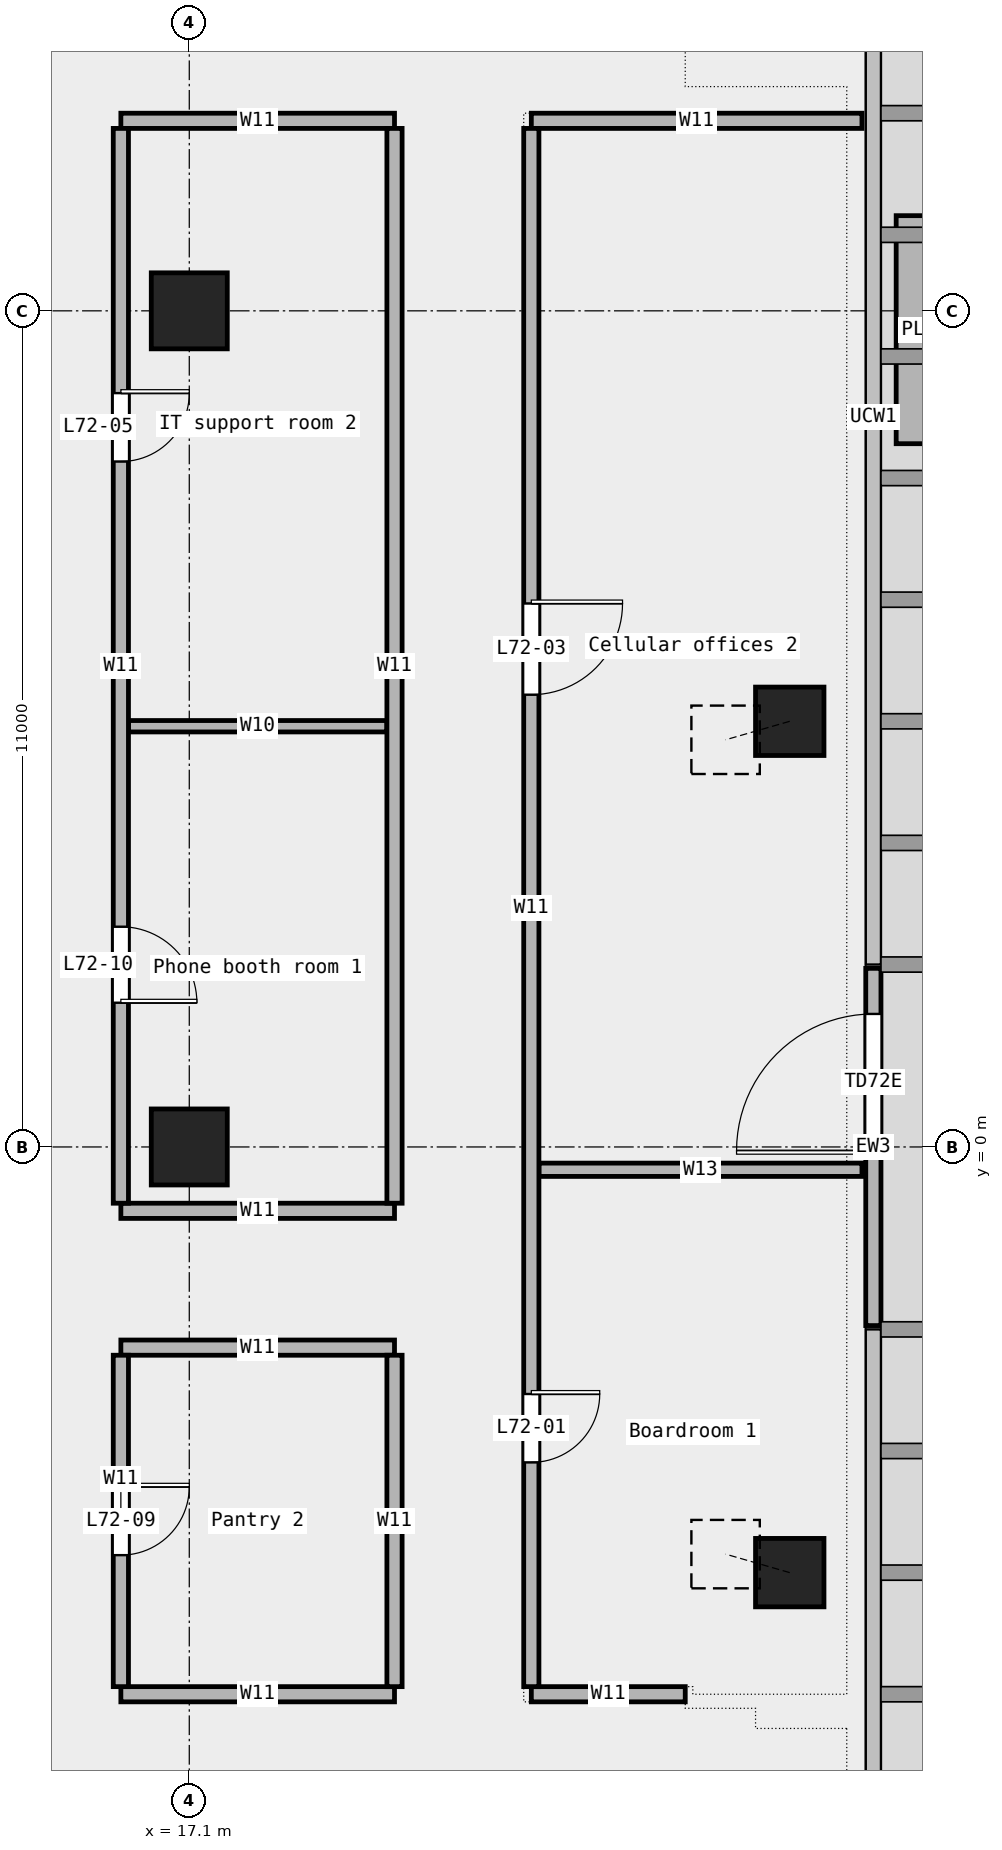
"""IFC4 building model, lengths in metres.
Left out: names, types, materials, properties, quantities, classifications, styles, units other than length and angle.
Written with IfcOpenShell. Run it as: python <this file> out.ifc"""

import sys

from ifc_helpers import new_model, si_unit, direction, frame, frame_2d, origin, origin_2d, place, context, subcontext, project, spatial, rectangle, extrude, element, fill, save


model = new_model("IFC4")
c1 = context("Model", 3, precision=1e-05, world=origin(), true_north=direction((0.0, 1.0)))
c2 = subcontext(c1, "Body", "Model", "MODEL_VIEW")
j1 = project(units=[si_unit("LENGTHUNIT", "METRE"), si_unit("PLANEANGLEUNIT", "RADIAN")], contexts=[c1])
p1 = place(None, origin())
s1 = spatial("IfcSite", under=j1, at=p1, CompositionType="ELEMENT")
p2 = place(p1, origin())
s2 = spatial("IfcBuilding", under=s1, at=p2, CompositionType="ELEMENT")
p3 = place(p2, frame((0.0, 0.0, 329.4)))
s3 = spatial("IfcBuildingStorey", under=s2, at=p3, CompositionType="ELEMENT", Elevation=329.4)
for number, where, z_axis, x_axis in (
    (1, (25.0, -5.6, 0.0), (-0.225, 0.065, 0.972), (-0.277, -0.961, 0.0)),
    (2, (25.0, 5.6, 0.0), (-0.225, -0.065, 0.972), (0.277, -0.961, 0.0)),
):
    element("IfcColumn", number, at=place(p3, frame(where, z_axis=z_axis, x_axis=x_axis)), inside=s3, PredefinedType="COLUMN", context=c2, shape_type="SweptSolid", body=[
        extrude(rectangle(XDim=0.9, YDim=0.9, at=origin_2d()), origin(), (0.0, 0.0, 1.0), 3.754),
    ])
for number, where, z_axis, x_axis in (
    (3, (17.1, 0.0, 0.0), (0.0, 0.0, 1.0), (1.0, 0.0, 0.0)),
    (4, (17.1, 11.0, 0.0), (0.0, 0.0, 1.0), (1.0, 0.0, 0.0)),
):
    element("IfcColumn", number, at=place(p3, frame(where, z_axis=z_axis, x_axis=x_axis)), inside=s3, PredefinedType="COLUMN", context=c2, shape_type="SweptSolid", body=[
        extrude(rectangle(XDim=1.0, YDim=1.0, at=origin_2d()), origin(), (0.0, 0.0, 1.0), 3.65),
    ])
p4 = place(p3, frame((26.1, -2.35, 0.0), z_axis=(0.0, 0.0, 1.0), x_axis=(0.0, 1.0, 0.0)))
e5 = element("IfcWall", 5, at=p4, inside=s3, PredefinedType="STANDARD", context=c2, shape_type="SweptSolid", body=[
    extrude(rectangle(XDim=4.7, YDim=0.2, at=frame_2d((2.35, 0.0))), origin(), (0.0, 0.0, 1.0), 3.65),
])
p5 = place(p4, frame((2.3, 0.0, 0.0)))
e6 = element("IfcOpeningElement", 6, at=p5, cuts=e5, PredefinedType="OPENING", context=c2, shape_type="SweptSolid", body=[
    extrude(rectangle(XDim=1.8, YDim=2.4, at=frame_2d((0.9, 1.2))), frame((0.0, 0.112, 0.0), z_axis=(0.0, -1.0, 0.0), x_axis=(1.0, 0.0, 0.0)), (0.0, 0.0, 1.0), 0.224),
])
p6 = place(p3, frame((26.7, 9.252, 0.0), z_axis=(0.0, 0.0, 1.0), x_axis=(0.0, 1.0, 0.0)))
e7 = element("IfcWall", 7, at=p6, inside=s3, PredefinedType="STANDARD", context=c2, shape_type="SweptSolid", body=[
    extrude(rectangle(XDim=3.0, YDim=0.6, at=frame_2d((1.5, 0.0))), origin(), (0.0, 0.0, 1.0), 0.7),
])
p7 = place(p3, frame((16.2, -7.2, 0.0), z_axis=(0.0, 0.0, 1.0), x_axis=(1.0, 0.0, 0.0)))
e8 = element("IfcWall", 8, at=p7, inside=s3, PredefinedType="PARTITIONING", context=c2, shape_type="SweptSolid", body=[
    extrude(rectangle(XDim=3.6, YDim=0.2, at=frame_2d((1.8, 0.0))), origin(), (0.0, 0.0, 1.0), 3.65),
])
p8 = place(p3, frame((21.6, -7.2, 0.0), z_axis=(0.0, 0.0, 1.0), x_axis=(1.0, 0.0, 0.0)))
e9 = element("IfcWall", 9, at=p8, inside=s3, PredefinedType="PARTITIONING", context=c2, shape_type="SweptSolid", body=[
    extrude(rectangle(XDim=2.025, YDim=0.2, at=frame_2d((1.012, 0.0))), origin(), (0.0, 0.0, 1.0), 3.65),
])
for number, where, z_axis, x_axis in (
    (10, (16.2, -2.64, 0.0), (0.0, 0.0, 1.0), (1.0, 0.0, 0.0)),
    (11, (16.2, -0.84, 0.0), (0.0, 0.0, 1.0), (1.0, 0.0, 0.0)),
):
    element("IfcWall", number, at=place(p3, frame(where, z_axis=z_axis, x_axis=x_axis)), inside=s3, PredefinedType="PARTITIONING", context=c2, shape_type="SweptSolid", body=[
        extrude(rectangle(XDim=3.6, YDim=0.2, at=frame_2d((1.8, 0.0))), origin(), (0.0, 0.0, 1.0), 3.65),
    ])
p9 = place(p3, frame((21.7, -0.3, 0.0), z_axis=(0.0, 0.0, 1.0), x_axis=(1.0, 0.0, 0.0)))
e12 = element("IfcWall", 12, at=p9, inside=s3, PredefinedType="PARTITIONING", context=c2, shape_type="SweptSolid", body=[
    extrude(rectangle(XDim=4.25, YDim=0.175, at=frame_2d((2.125, 0.0))), origin(), (0.0, 0.0, 1.0), 3.65),
])
p10 = place(p3, frame((16.3, 5.535, 0.0), z_axis=(0.0, 0.0, 1.0), x_axis=(1.0, 0.0, 0.0)))
e13 = element("IfcWall", 13, at=p10, inside=s3, PredefinedType="PARTITIONING", context=c2, shape_type="SweptSolid", body=[
    extrude(rectangle(XDim=3.4, YDim=0.15, at=frame_2d((1.7, 0.0))), origin(), (0.0, 0.0, 1.0), 3.65),
])
p11 = place(p3, frame((16.2, 13.5, 0.0), z_axis=(0.0, 0.0, 1.0), x_axis=(1.0, 0.0, 0.0)))
e14 = element("IfcWall", 14, at=p11, inside=s3, PredefinedType="PARTITIONING", context=c2, shape_type="SweptSolid", body=[
    extrude(rectangle(XDim=3.6, YDim=0.2, at=frame_2d((1.8, 0.0))), origin(), (0.0, 0.0, 1.0), 3.65),
])
p12 = place(p3, frame((21.6, 13.5, 0.0), z_axis=(0.0, 0.0, 1.0), x_axis=(1.0, 0.0, 0.0)))
e15 = element("IfcWall", 15, at=p12, inside=s3, PredefinedType="PARTITIONING", context=c2, shape_type="SweptSolid", body=[
    extrude(rectangle(XDim=4.35, YDim=0.2, at=frame_2d((2.175, 0.0))), origin(), (0.0, 0.0, 1.0), 3.65),
])
p13 = place(p3, frame((16.2, -7.1, 0.0), z_axis=(0.0, 0.0, 1.0), x_axis=(0.0, 1.0, 0.0)))
e16 = element("IfcWall", 16, at=p13, inside=s3, PredefinedType="PARTITIONING", context=c2, shape_type="SweptSolid", body=[
    extrude(rectangle(XDim=4.36, YDim=0.2, at=frame_2d((2.18, 0.0))), origin(), (0.0, 0.0, 1.0), 3.65),
])
p14 = place(p13, frame((1.73, 0.0, 0.0)))
e17 = element("IfcOpeningElement", 17, at=p14, cuts=e16, PredefinedType="OPENING", context=c2, shape_type="SweptSolid", body=[
    extrude(rectangle(XDim=0.9, YDim=2.1, at=frame_2d((0.45, 1.05))), frame((0.0, 0.112, 0.0), z_axis=(0.0, -1.0, 0.0), x_axis=(1.0, 0.0, 0.0)), (0.0, 0.0, 1.0), 0.224),
])
p15 = place(p3, frame((16.2, -0.74, 0.0), z_axis=(0.0, 0.0, 1.0), x_axis=(0.0, 1.0, 0.0)))
e18 = element("IfcWall", 18, at=p15, inside=s3, PredefinedType="PARTITIONING", context=c2, shape_type="SweptSolid", body=[
    extrude(rectangle(XDim=14.14, YDim=0.2, at=frame_2d((7.07, 0.0))), origin(), (0.0, 0.0, 1.0), 3.65),
])
p16 = place(p15, frame((9.758, 0.0, 0.0)))
e19 = element("IfcOpeningElement", 19, at=p16, cuts=e18, PredefinedType="OPENING", context=c2, shape_type="SweptSolid", body=[
    extrude(rectangle(XDim=0.9, YDim=2.1, at=frame_2d((0.45, 1.05))), frame((0.0, 0.112, 0.0), z_axis=(0.0, -1.0, 0.0), x_axis=(1.0, 0.0, 0.0)), (0.0, 0.0, 1.0), 0.224),
])
p17 = place(p15, frame((2.637, 0.0, 0.0)))
e20 = element("IfcOpeningElement", 20, at=p17, cuts=e18, PredefinedType="OPENING", context=c2, shape_type="SweptSolid", body=[
    extrude(rectangle(XDim=1.0, YDim=2.1, at=frame_2d((0.5, 1.05))), frame((0.0, 0.112, 0.0), z_axis=(0.0, -1.0, 0.0), x_axis=(1.0, 0.0, 0.0)), (0.0, 0.0, 1.0), 0.224),
])
p18 = place(p3, frame((19.8, -7.1, 0.0), z_axis=(0.0, 0.0, 1.0), x_axis=(0.0, 1.0, 0.0)))
e21 = element("IfcWall", 21, at=p18, inside=s3, PredefinedType="PARTITIONING", context=c2, shape_type="SweptSolid", body=[
    extrude(rectangle(XDim=4.36, YDim=0.2, at=frame_2d((2.18, 0.0))), origin(), (0.0, 0.0, 1.0), 3.65),
])
p19 = place(p3, frame((19.8, -0.74, 0.0), z_axis=(0.0, 0.0, 1.0), x_axis=(0.0, 1.0, 0.0)))
e22 = element("IfcWall", 22, at=p19, inside=s3, PredefinedType="PARTITIONING", context=c2, shape_type="SweptSolid", body=[
    extrude(rectangle(XDim=14.14, YDim=0.2, at=frame_2d((7.07, 0.0))), origin(), (0.0, 0.0, 1.0), 3.65),
])
p20 = place(p3, frame((21.6, -7.1, 0.0), z_axis=(0.0, 0.0, 1.0), x_axis=(0.0, 1.0, 0.0)))
e23 = element("IfcWall", 23, at=p20, inside=s3, PredefinedType="PARTITIONING", context=c2, shape_type="SweptSolid", body=[
    extrude(rectangle(XDim=20.5, YDim=0.2, at=frame_2d((10.25, 0.0))), origin(), (0.0, 0.0, 1.0), 3.65),
])
p21 = place(p20, frame((2.95, 0.0, 0.0)))
e24 = element("IfcOpeningElement", 24, at=p21, cuts=e23, PredefinedType="OPENING", context=c2, shape_type="SweptSolid", body=[
    extrude(rectangle(XDim=0.9, YDim=2.1, at=frame_2d((0.45, 1.05))), frame((0.0, 0.112, 0.0), z_axis=(0.0, -1.0, 0.0), x_axis=(1.0, 0.0, 0.0)), (0.0, 0.0, 1.0), 0.224),
])
p22 = place(p20, frame((13.05, 0.0, 0.0)))
e25 = element("IfcOpeningElement", 25, at=p22, cuts=e23, PredefinedType="OPENING", context=c2, shape_type="SweptSolid", body=[
    extrude(rectangle(XDim=1.2, YDim=2.1, at=frame_2d((0.6, 1.05))), frame((0.0, 0.112, 0.0), z_axis=(0.0, -1.0, 0.0), x_axis=(1.0, 0.0, 0.0)), (0.0, 0.0, 1.0), 0.224),
])
p23 = place(p5, origin())
e26 = element("IfcDoor", 26, at=p23, inside=s3, OperationType="DOUBLE_DOOR_SINGLE_SWING", PredefinedType="DOOR", context=c2, shape_type="SweptSolid", body=[
    extrude(rectangle(XDim=1.8, YDim=2.4, at=frame_2d((0.9, 1.2))), frame((0.0, 0.025, 0.0), z_axis=(0.0, -1.0, 0.0), x_axis=(1.0, 0.0, 0.0)), (0.0, 0.0, 1.0), 0.05),
])
fill(e6, e26)
p24 = place(p21, origin())
e27 = element("IfcDoor", 27, at=p24, inside=s3, OperationType="SINGLE_SWING_LEFT", PredefinedType="DOOR", context=c2, shape_type="SweptSolid", body=[
    extrude(rectangle(XDim=0.9, YDim=2.1, at=frame_2d((0.45, 1.05))), frame((0.0, 0.025, 0.0), z_axis=(0.0, -1.0, 0.0), x_axis=(1.0, 0.0, 0.0)), (0.0, 0.0, 1.0), 0.05),
])
fill(e24, e27)
p25 = place(p22, origin())
e28 = element("IfcDoor", 28, at=p25, inside=s3, OperationType="SINGLE_SWING_LEFT", PredefinedType="DOOR", context=c2, shape_type="SweptSolid", body=[
    extrude(rectangle(XDim=1.2, YDim=2.1, at=frame_2d((0.6, 1.05))), frame((0.0, 0.025, 0.0), z_axis=(0.0, -1.0, 0.0), x_axis=(1.0, 0.0, 0.0)), (0.0, 0.0, 1.0), 0.05),
])
fill(e25, e28)
p26 = place(p16, origin())
e29 = element("IfcDoor", 29, at=p26, inside=s3, OperationType="SINGLE_SWING_LEFT", PredefinedType="DOOR", context=c2, shape_type="SweptSolid", body=[
    extrude(rectangle(XDim=0.9, YDim=2.1, at=frame_2d((0.45, 1.05))), frame((0.0, 0.025, 0.0), z_axis=(0.0, -1.0, 0.0), x_axis=(1.0, 0.0, 0.0)), (0.0, 0.0, 1.0), 0.05),
])
fill(e19, e29)
p27 = place(p14, origin())
e30 = element("IfcDoor", 30, at=p27, inside=s3, OperationType="SINGLE_SWING_LEFT", PredefinedType="DOOR", context=c2, shape_type="SweptSolid", body=[
    extrude(rectangle(XDim=0.9, YDim=2.1, at=frame_2d((0.45, 1.05))), frame((0.0, 0.025, 0.0), z_axis=(0.0, -1.0, 0.0), x_axis=(1.0, 0.0, 0.0)), (0.0, 0.0, 1.0), 0.05),
])
fill(e17, e30)
p28 = place(p17, origin())
e31 = element("IfcDoor", 31, at=p28, inside=s3, OperationType="SINGLE_SWING_RIGHT", PredefinedType="DOOR", context=c2, shape_type="SweptSolid", body=[
    extrude(rectangle(XDim=1.0, YDim=2.1, at=frame_2d((0.5, 1.05))), frame((0.0, 0.025, 0.0), z_axis=(0.0, -1.0, 0.0), x_axis=(1.0, 0.0, 0.0)), (0.0, 0.0, 1.0), 0.05),
])
fill(e20, e31)
save(model, sys.argv[1])
